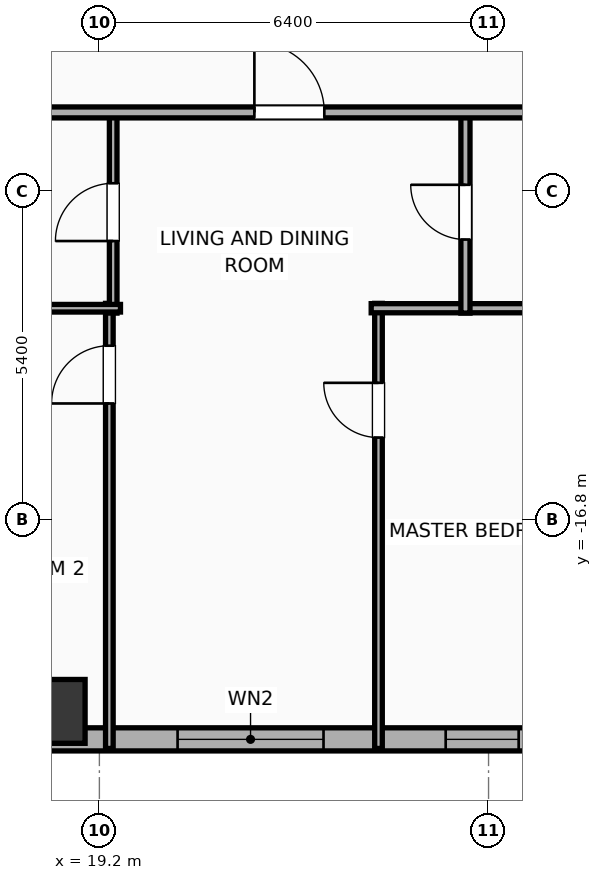
"""IFC4 building model, lengths in metres.
Left out: names, types, materials, properties, quantities, classifications, styles, units other than length and angle.
Written with IfcOpenShell. Run it as: python <this file> out.ifc"""

import sys

from ifc_helpers import new_model, si_unit, direction, frame, frame_2d, origin, origin_2d, place, context, subcontext, project, spatial, rectangle, hollow_rectangle, extrude, element, fill, save


model = new_model("IFC4")
c1 = context("Model", 3, precision=1e-05, world=origin(), true_north=direction((0.0, 1.0)))
c2 = subcontext(c1, "Body", "Model", "MODEL_VIEW")
j1 = project(units=[si_unit("LENGTHUNIT", "METRE"), si_unit("PLANEANGLEUNIT", "RADIAN")], contexts=[c1])
p1 = place(None, origin())
s1 = spatial("IfcSite", under=j1, at=p1, CompositionType="ELEMENT")
p2 = place(p1, origin())
s2 = spatial("IfcBuilding", under=s1, at=p2, CompositionType="ELEMENT")
p3 = place(p2, frame((0.0, 0.0, 97.5)))
s3 = spatial("IfcBuildingStorey", under=s2, at=p3, CompositionType="ELEMENT", Elevation=97.5)
p4 = place(p3, frame((18.44, -19.95, 0.0), z_axis=(0.0, 0.0, 1.0), x_axis=(1.0, 0.0, 0.0)))
e1 = element("IfcColumn", 1, at=p4, inside=s3, PredefinedType="COLUMN", context=c2, shape_type="SweptSolid", body=[
    extrude(hollow_rectangle(XDim=1.05, YDim=1.05, WallThickness=0.036, at=origin_2d()), origin(), (0.0, 0.0, 1.0), 3.9),
])
p5 = place(p3, frame((29.381, -20.41, 0.0), z_axis=(0.0, 0.0, 1.0), x_axis=(-1.0, 0.0, 0.0)))
e2 = element("IfcWall", 2, at=p5, inside=s3, PredefinedType="ELEMENTEDWALL", context=c2, shape_type="SweptSolid", body=[
    extrude(rectangle(XDim=54.763, YDim=0.38, at=frame_2d((27.381, 0.0))), origin(), (0.0, 0.0, 1.0), 3.65),
])
p6 = place(p5, frame((6.495, 0.0, 0.75)))
e3 = element("IfcOpeningElement", 3, at=p6, cuts=e2, PredefinedType="OPENING", context=c2, shape_type="SweptSolid", body=[
    extrude(rectangle(XDim=2.4, YDim=2.1, at=frame_2d((1.2, 1.05))), frame((0.0, 0.2, 0.0), z_axis=(0.0, -1.0, 0.0), x_axis=(1.0, 0.0, 0.0)), (0.0, 0.0, 1.0), 0.4),
])
p7 = place(p5, frame((17.686, 0.0, 0.75)))
e4 = element("IfcOpeningElement", 4, at=p7, cuts=e2, PredefinedType="OPENING", context=c2, shape_type="SweptSolid", body=[
    extrude(rectangle(XDim=2.4, YDim=2.1, at=frame_2d((1.2, 1.05))), frame((0.0, 0.2, 0.0), z_axis=(0.0, -1.0, 0.0), x_axis=(1.0, 0.0, 0.0)), (0.0, 0.0, 1.0), 0.4),
])
p8 = place(p5, frame((34.677, 0.0, 0.75)))
e5 = element("IfcOpeningElement", 5, at=p8, cuts=e2, PredefinedType="OPENING", context=c2, shape_type="SweptSolid", body=[
    extrude(rectangle(XDim=2.4, YDim=2.1, at=frame_2d((1.2, 1.05))), frame((0.0, 0.2, 0.0), z_axis=(0.0, -1.0, 0.0), x_axis=(1.0, 0.0, 0.0)), (0.0, 0.0, 1.0), 0.4),
])
p9 = place(p5, frame((45.867, 0.0, 0.75)))
e6 = element("IfcOpeningElement", 6, at=p9, cuts=e2, PredefinedType="OPENING", context=c2, shape_type="SweptSolid", body=[
    extrude(rectangle(XDim=2.4, YDim=2.1, at=frame_2d((1.2, 1.05))), frame((0.0, 0.2, 0.0), z_axis=(0.0, -1.0, 0.0), x_axis=(1.0, 0.0, 0.0)), (0.0, 0.0, 1.0), 0.4),
])
p10 = place(p5, frame((52.281, 0.0, 0.75)))
e7 = element("IfcOpeningElement", 7, at=p10, cuts=e2, PredefinedType="OPENING", context=c2, shape_type="SweptSolid", body=[
    extrude(rectangle(XDim=1.2, YDim=2.05, at=frame_2d((0.6, 1.025))), frame((0.0, 0.2, 0.0), z_axis=(0.0, -1.0, 0.0), x_axis=(1.0, 0.0, 0.0)), (0.0, 0.0, 1.0), 0.4),
])
p11 = place(p5, frame((49.641, 0.0, 0.75)))
e8 = element("IfcOpeningElement", 8, at=p11, cuts=e2, PredefinedType="OPENING", context=c2, shape_type="SweptSolid", body=[
    extrude(rectangle(XDim=1.2, YDim=2.05, at=frame_2d((0.6, 1.025))), frame((0.0, 0.2, 0.0), z_axis=(0.0, -1.0, 0.0), x_axis=(1.0, 0.0, 0.0)), (0.0, 0.0, 1.0), 0.4),
])
p12 = place(p5, frame((39.543, 0.0, 0.75)))
e9 = element("IfcOpeningElement", 9, at=p12, cuts=e2, PredefinedType="OPENING", context=c2, shape_type="SweptSolid", body=[
    extrude(rectangle(XDim=1.2, YDim=2.05, at=frame_2d((0.6, 1.025))), frame((0.0, 0.2, 0.0), z_axis=(0.0, -1.0, 0.0), x_axis=(1.0, 0.0, 0.0)), (0.0, 0.0, 1.0), 0.4),
])
p13 = place(p5, frame((44.538, 0.0, 0.75)))
e10 = element("IfcOpeningElement", 10, at=p13, cuts=e2, PredefinedType="OPENING", context=c2, shape_type="SweptSolid", body=[
    extrude(rectangle(XDim=0.52, YDim=2.05, at=frame_2d((0.26, 1.025))), frame((0.0, 0.2, 0.0), z_axis=(0.0, -1.0, 0.0), x_axis=(1.0, 0.0, 0.0)), (0.0, 0.0, 1.0), 0.4),
])
p14 = place(p5, frame((28.206, 0.0, 0.75)))
e11 = element("IfcOpeningElement", 11, at=p14, cuts=e2, PredefinedType="OPENING", context=c2, shape_type="SweptSolid", body=[
    extrude(rectangle(XDim=1.2, YDim=2.05, at=frame_2d((0.6, 1.025))), frame((0.0, 0.2, 0.0), z_axis=(0.0, -1.0, 0.0), x_axis=(1.0, 0.0, 0.0)), (0.0, 0.0, 1.0), 0.4),
])
p15 = place(p5, frame((31.241, 0.0, 0.75)))
e12 = element("IfcOpeningElement", 12, at=p15, cuts=e2, PredefinedType="OPENING", context=c2, shape_type="SweptSolid", body=[
    extrude(rectangle(XDim=0.85, YDim=2.05, at=frame_2d((0.425, 1.025))), frame((0.0, 0.2, 0.0), z_axis=(0.0, -1.0, 0.0), x_axis=(1.0, 0.0, 0.0)), (0.0, 0.0, 1.0), 0.4),
])
p16 = place(p5, frame((24.561, 0.0, 0.75)))
e13 = element("IfcOpeningElement", 13, at=p16, cuts=e2, PredefinedType="OPENING", context=c2, shape_type="SweptSolid", body=[
    extrude(rectangle(XDim=1.2, YDim=2.05, at=frame_2d((0.6, 1.025))), frame((0.0, 0.2, 0.0), z_axis=(0.0, -1.0, 0.0), x_axis=(1.0, 0.0, 0.0)), (0.0, 0.0, 1.0), 0.4),
])
p17 = place(p5, frame((22.561, 0.0, 0.75)))
e14 = element("IfcOpeningElement", 14, at=p17, cuts=e2, PredefinedType="OPENING", context=c2, shape_type="SweptSolid", body=[
    extrude(rectangle(XDim=0.52, YDim=2.05, at=frame_2d((0.26, 1.025))), frame((0.0, 0.2, 0.0), z_axis=(0.0, -1.0, 0.0), x_axis=(1.0, 0.0, 0.0)), (0.0, 0.0, 1.0), 0.4),
])
p18 = place(p5, frame((13.886, 0.0, 0.75)))
e15 = element("IfcOpeningElement", 15, at=p18, cuts=e2, PredefinedType="OPENING", context=c2, shape_type="SweptSolid", body=[
    extrude(rectangle(XDim=1.2, YDim=2.05, at=frame_2d((0.6, 1.025))), frame((0.0, 0.2, 0.0), z_axis=(0.0, -1.0, 0.0), x_axis=(1.0, 0.0, 0.0)), (0.0, 0.0, 1.0), 0.4),
])
p19 = place(p5, frame((11.694, 0.0, 0.75)))
e16 = element("IfcOpeningElement", 16, at=p19, cuts=e2, PredefinedType="OPENING", context=c2, shape_type="SweptSolid", body=[
    extrude(rectangle(XDim=0.85, YDim=2.05, at=frame_2d((0.425, 1.025))), frame((0.0, 0.2, 0.0), z_axis=(0.0, -1.0, 0.0), x_axis=(1.0, 0.0, 0.0)), (0.0, 0.0, 1.0), 0.4),
])
p20 = place(p5, frame((3.286, 0.0, 0.75)))
e17 = element("IfcOpeningElement", 17, at=p20, cuts=e2, PredefinedType="OPENING", context=c2, shape_type="SweptSolid", body=[
    extrude(rectangle(XDim=1.2, YDim=2.05, at=frame_2d((0.6, 1.025))), frame((0.0, 0.2, 0.0), z_axis=(0.0, -1.0, 0.0), x_axis=(1.0, 0.0, 0.0)), (0.0, 0.0, 1.0), 0.4),
])
p21 = place(p5, frame((0.816, 0.0, 0.75)))
e18 = element("IfcOpeningElement", 18, at=p21, cuts=e2, PredefinedType="OPENING", context=c2, shape_type="SweptSolid", body=[
    extrude(rectangle(XDim=1.2, YDim=2.05, at=frame_2d((0.6, 1.025))), frame((0.0, 0.2, 0.0), z_axis=(0.0, -1.0, 0.0), x_axis=(1.0, 0.0, 0.0)), (0.0, 0.0, 1.0), 0.4),
])
p22 = place(p3, frame((19.364, -20.56, 0.0), z_axis=(0.0, 0.0, 1.0), x_axis=(0.0, 1.0, 0.0)))
e19 = element("IfcWall", 19, at=p22, inside=s3, PredefinedType="PARTITIONING", context=c2, shape_type="SweptSolid", body=[
    extrude(rectangle(XDim=7.32, YDim=0.125, at=frame_2d((3.66, 0.0))), origin(), (0.0, 0.0, 1.0), 3.65),
])
p23 = place(p22, frame((5.674, 0.0, 0.0)))
e20 = element("IfcOpeningElement", 20, at=p23, cuts=e19, PredefinedType="OPENING", context=c2, shape_type="SweptSolid", body=[
    extrude(rectangle(XDim=0.95, YDim=2.05, at=frame_2d((0.475, 1.025))), frame((0.0, 0.073, 0.0), z_axis=(0.0, -1.0, 0.0), x_axis=(1.0, 0.0, 0.0)), (0.0, 0.0, 1.0), 0.145),
])
p24 = place(p3, frame((23.79, -20.56, 0.0), z_axis=(0.0, 0.0, 1.0), x_axis=(0.0, 1.0, 0.0)))
e21 = element("IfcWall", 21, at=p24, inside=s3, PredefinedType="PARTITIONING", context=c2, shape_type="SweptSolid", body=[
    extrude(rectangle(XDim=7.32, YDim=0.125, at=frame_2d((3.66, 0.0))), origin(), (0.0, 0.0, 1.0), 3.65),
])
p25 = place(p24, frame((5.113, 0.0, 0.0)))
e22 = element("IfcOpeningElement", 22, at=p25, cuts=e21, PredefinedType="OPENING", context=c2, shape_type="SweptSolid", body=[
    extrude(rectangle(XDim=0.9, YDim=2.05, at=frame_2d((0.45, 1.025))), frame((0.0, 0.073, 0.0), z_axis=(0.0, -1.0, 0.0), x_axis=(1.0, 0.0, 0.0)), (0.0, 0.0, 1.0), 0.145),
])
p26 = place(p3, frame((23.67, -13.32, 0.0), z_axis=(0.0, 0.0, 1.0), x_axis=(1.0, 0.0, 0.0)))
e23 = element("IfcWall", 23, at=p26, inside=s3, PredefinedType="PLUMBINGWALL", context=c2, shape_type="SweptSolid", body=[
    extrude(rectangle(XDim=3.79, YDim=0.15, at=frame_2d((1.895, 0.0))), origin(), (0.0, 0.0, 1.0), 3.65),
])
p27 = place(p3, frame((19.427, -13.4, 0.0), z_axis=(0.0, 0.0, 1.0), x_axis=(0.0, 1.0, 0.0)))
e24 = element("IfcWall", 24, at=p27, inside=s3, PredefinedType="PARTITIONING", context=c2, shape_type="SweptSolid", body=[
    extrude(rectangle(XDim=3.32, YDim=0.125, at=frame_2d((1.66, 0.0))), origin(), (0.0, 0.0, 1.0), 3.65),
])
p28 = place(p27, frame((1.185, 0.0, 0.0)))
e25 = element("IfcOpeningElement", 25, at=p28, cuts=e24, PredefinedType="OPENING", context=c2, shape_type="SweptSolid", body=[
    extrude(rectangle(XDim=0.95, YDim=2.05, at=frame_2d((0.475, 1.025))), frame((0.0, 0.073, 0.0), z_axis=(0.0, -1.0, 0.0), x_axis=(1.0, 0.0, 0.0)), (0.0, 0.0, 1.0), 0.145),
])
p29 = place(p3, frame((16.525, -13.32, 0.0), z_axis=(0.0, 0.0, 1.0), x_axis=(1.0, 0.0, 0.0)))
e26 = element("IfcWall", 26, at=p29, inside=s3, PredefinedType="PARTITIONING", context=c2, shape_type="SweptSolid", body=[
    extrude(rectangle(XDim=3.022, YDim=0.125, at=frame_2d((1.511, 0.0))), origin(), (0.0, 0.0, 1.0), 3.65),
])
p30 = place(p3, frame((25.22, -13.4, 0.0), z_axis=(0.0, 0.0, 1.0), x_axis=(0.0, 1.0, 0.0)))
e27 = element("IfcWall", 27, at=p30, inside=s3, PredefinedType="PLUMBINGWALL", context=c2, shape_type="SweptSolid", body=[
    extrude(rectangle(XDim=3.32, YDim=0.15, at=frame_2d((1.66, 0.0))), origin(), (0.0, 0.0, 1.0), 3.65),
])
p31 = place(p30, frame((1.21, 0.0, 0.0)))
e28 = element("IfcOpeningElement", 28, at=p31, cuts=e27, PredefinedType="OPENING", context=c2, shape_type="SweptSolid", body=[
    extrude(rectangle(XDim=0.9, YDim=2.05, at=frame_2d((0.45, 1.025))), frame((0.0, 0.085, 0.0), z_axis=(0.0, -1.0, 0.0), x_axis=(1.0, 0.0, 0.0)), (0.0, 0.0, 1.0), 0.17),
])
p32 = place(p3, frame((-29.21, -10.1, 0.0), z_axis=(0.0, 0.0, 1.0), x_axis=(1.0, 0.0, 0.0)))
e29 = element("IfcWall", 29, at=p32, inside=s3, PredefinedType="PARTITIONING", context=c2, shape_type="SweptSolid", body=[
    extrude(rectangle(XDim=62.42, YDim=0.18, at=frame_2d((31.21, 0.0))), origin(), (0.0, 0.0, 1.0), 3.65),
])
p33 = place(p32, frame((3.033, 0.0, 0.0)))
e30 = element("IfcOpeningElement", 30, at=p33, cuts=e29, PredefinedType="OPENING", context=c2, shape_type="SweptSolid", body=[
    extrude(rectangle(XDim=0.9, YDim=2.05, at=frame_2d((0.45, 1.025))), frame((0.0, 0.1, 0.0), z_axis=(0.0, -1.0, 0.0), x_axis=(1.0, 0.0, 0.0)), (0.0, 0.0, 1.0), 0.2),
])
p34 = place(p32, frame((9.768, 0.0, 0.0)))
e31 = element("IfcOpeningElement", 31, at=p34, cuts=e29, PredefinedType="OPENING", context=c2, shape_type="SweptSolid", body=[
    extrude(rectangle(XDim=0.9, YDim=2.05, at=frame_2d((0.45, 1.025))), frame((0.0, 0.1, 0.0), z_axis=(0.0, -1.0, 0.0), x_axis=(1.0, 0.0, 0.0)), (0.0, 0.0, 1.0), 0.2),
])
p35 = place(p32, frame((18.65, 0.0, 0.0)))
e32 = element("IfcOpeningElement", 32, at=p35, cuts=e29, PredefinedType="OPENING", context=c2, shape_type="SweptSolid", body=[
    extrude(rectangle(XDim=1.15, YDim=2.05, at=frame_2d((0.575, 1.025))), frame((0.0, 0.1, 0.0), z_axis=(0.0, -1.0, 0.0), x_axis=(1.0, 0.0, 0.0)), (0.0, 0.0, 1.0), 0.2),
])
p36 = place(p32, frame((29.212, 0.0, 0.0)))
e33 = element("IfcOpeningElement", 33, at=p36, cuts=e29, PredefinedType="OPENING", context=c2, shape_type="SweptSolid", body=[
    extrude(rectangle(XDim=1.15, YDim=2.05, at=frame_2d((0.575, 1.025))), frame((0.0, 0.1, 0.0), z_axis=(0.0, -1.0, 0.0), x_axis=(1.0, 0.0, 0.0)), (0.0, 0.0, 1.0), 0.2),
])
p37 = place(p32, frame((40.379, 0.0, 0.0)))
e34 = element("IfcOpeningElement", 34, at=p37, cuts=e29, PredefinedType="OPENING", context=c2, shape_type="SweptSolid", body=[
    extrude(rectangle(XDim=1.15, YDim=2.05, at=frame_2d((0.575, 1.025))), frame((0.0, 0.1, 0.0), z_axis=(0.0, -1.0, 0.0), x_axis=(1.0, 0.0, 0.0)), (0.0, 0.0, 1.0), 0.2),
])
p38 = place(p32, frame((50.959, 0.0, 0.0)))
e35 = element("IfcOpeningElement", 35, at=p38, cuts=e29, PredefinedType="OPENING", context=c2, shape_type="SweptSolid", body=[
    extrude(rectangle(XDim=1.15, YDim=2.05, at=frame_2d((0.575, 1.025))), frame((0.0, 0.1, 0.0), z_axis=(0.0, -1.0, 0.0), x_axis=(1.0, 0.0, 0.0)), (0.0, 0.0, 1.0), 0.2),
])
p39 = place(p32, frame((59.117, 0.0, 0.0)))
e36 = element("IfcOpeningElement", 36, at=p39, cuts=e29, PredefinedType="OPENING", context=c2, shape_type="SweptSolid", body=[
    extrude(rectangle(XDim=0.9, YDim=2.05, at=frame_2d((0.45, 1.025))), frame((0.0, 0.1, 0.0), z_axis=(0.0, -1.0, 0.0), x_axis=(1.0, 0.0, 0.0)), (0.0, 0.0, 1.0), 0.2),
])
p40 = place(p6, origin())
e37 = element("IfcWindow", 37, at=p40, inside=s3, PartitioningType="SINGLE_PANEL", PredefinedType="WINDOW", context=c2, shape_type="SweptSolid", body=[
    extrude(rectangle(XDim=2.4, YDim=2.1, at=frame_2d((1.2, 1.05))), frame((0.0, 0.03, 0.0), z_axis=(0.0, -1.0, 0.0), x_axis=(1.0, 0.0, 0.0)), (0.0, 0.0, 1.0), 0.06),
])
fill(e3, e37)
p41 = place(p20, origin())
e38 = element("IfcWindow", 38, at=p41, inside=s3, PartitioningType="SINGLE_PANEL", PredefinedType="WINDOW", context=c2, shape_type="SweptSolid", body=[
    extrude(rectangle(XDim=1.2, YDim=2.05, at=frame_2d((0.6, 1.025))), frame((0.0, 0.03, 0.0), z_axis=(0.0, -1.0, 0.0), x_axis=(1.0, 0.0, 0.0)), (0.0, 0.0, 1.0), 0.06),
])
fill(e17, e38)
p42 = place(p23, origin())
e39 = element("IfcDoor", 39, at=p42, inside=s3, OperationType="SINGLE_SWING_LEFT", PredefinedType="DOOR", context=c2, shape_type="SweptSolid", body=[
    extrude(rectangle(XDim=0.95, YDim=2.05, at=frame_2d((0.475, 1.025))), frame((0.0, 0.025, 0.0), z_axis=(0.0, -1.0, 0.0), x_axis=(1.0, 0.0, 0.0)), (0.0, 0.0, 1.0), 0.05),
])
fill(e20, e39)
p43 = place(p25, origin())
e40 = element("IfcDoor", 40, at=p43, inside=s3, OperationType="SINGLE_SWING_RIGHT", PredefinedType="DOOR", context=c2, shape_type="SweptSolid", body=[
    extrude(rectangle(XDim=0.9, YDim=2.05, at=frame_2d((0.45, 1.025))), frame((0.0, 0.025, 0.0), z_axis=(0.0, -1.0, 0.0), x_axis=(1.0, 0.0, 0.0)), (0.0, 0.0, 1.0), 0.05),
])
fill(e22, e40)
p44 = place(p28, origin())
e41 = element("IfcDoor", 41, at=p44, inside=s3, OperationType="SINGLE_SWING_LEFT", PredefinedType="DOOR", context=c2, shape_type="SweptSolid", body=[
    extrude(rectangle(XDim=0.95, YDim=2.05, at=frame_2d((0.475, 1.025))), frame((0.0, 0.025, 0.0), z_axis=(0.0, -1.0, 0.0), x_axis=(1.0, 0.0, 0.0)), (0.0, 0.0, 1.0), 0.05),
])
fill(e25, e41)
p45 = place(p31, origin())
e42 = element("IfcDoor", 42, at=p45, inside=s3, OperationType="SINGLE_SWING_RIGHT", PredefinedType="DOOR", context=c2, shape_type="SweptSolid", body=[
    extrude(rectangle(XDim=0.9, YDim=2.05, at=frame_2d((0.45, 1.025))), frame((0.0, 0.025, 0.0), z_axis=(0.0, -1.0, 0.0), x_axis=(1.0, 0.0, 0.0)), (0.0, 0.0, 1.0), 0.05),
])
fill(e28, e42)
p46 = place(p38, origin())
e43 = element("IfcDoor", 43, at=p46, inside=s3, OperationType="SINGLE_SWING_LEFT", PredefinedType="DOOR", context=c2, shape_type="SweptSolid", body=[
    extrude(rectangle(XDim=1.15, YDim=2.05, at=frame_2d((0.575, 1.025))), frame((0.0, 0.025, 0.0), z_axis=(0.0, -1.0, 0.0), x_axis=(1.0, 0.0, 0.0)), (0.0, 0.0, 1.0), 0.05),
])
fill(e35, e43)
save(model, sys.argv[1])
